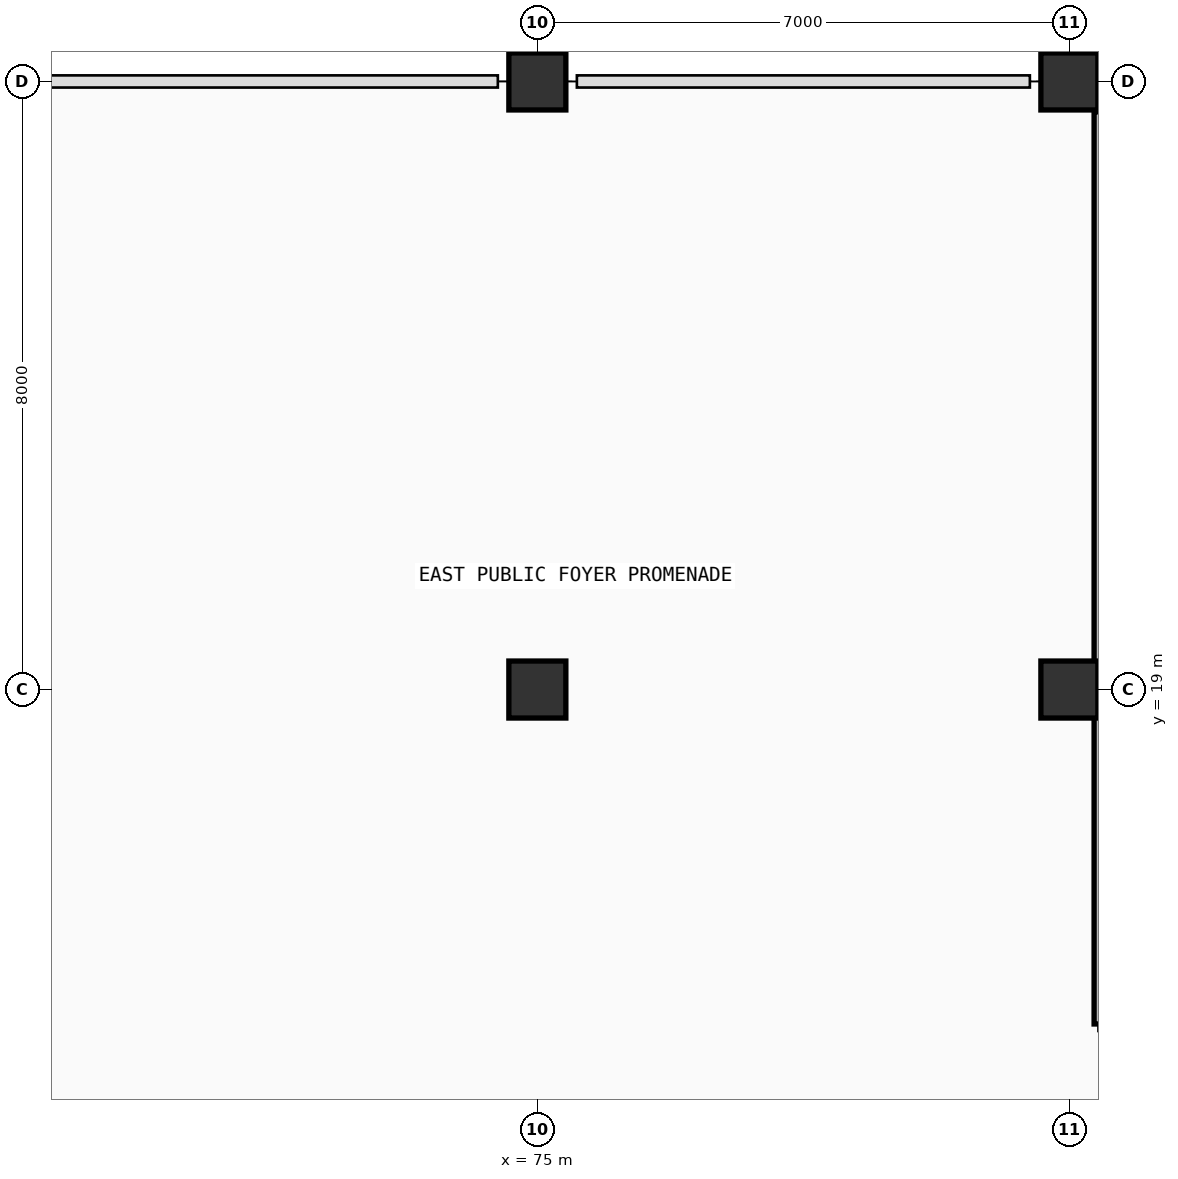
"""IFC4 building model, lengths in metres.
Left out: names, types, materials, properties, quantities, classifications, styles, units other than length and angle.
Written with IfcOpenShell. Run it as: python <this file> out.ifc"""

import sys

from ifc_helpers import new_model, si_unit, direction, frame, frame_2d, origin, origin_2d, place, context, subcontext, project, spatial, rectangle, extrude, element, save


model = new_model("IFC4")
c1 = context("Model", 3, precision=1e-05, world=origin(), true_north=direction((0.0, 1.0)))
c2 = subcontext(c1, "Body", "Model", "MODEL_VIEW")
j1 = project(units=[si_unit("LENGTHUNIT", "METRE"), si_unit("PLANEANGLEUNIT", "RADIAN")], contexts=[c1])
p1 = place(None, origin())
s1 = spatial("IfcSite", under=j1, at=p1, CompositionType="ELEMENT")
p2 = place(p1, origin())
s2 = spatial("IfcBuilding", under=s1, at=p2, CompositionType="ELEMENT")
p3 = place(p2, origin())
s3 = spatial("IfcBuildingStorey", under=s2, at=p3, CompositionType="ELEMENT", Elevation=0.0)
for number, where, z_axis, x_axis in (
    (1, (75.0, 19.0, 0.0), (0.0, 0.0, 1.0), (1.0, 0.0, 0.0)),
    (2, (75.0, 27.0, 0.0), (0.0, 0.0, 1.0), (1.0, 0.0, 0.0)),
    (3, (82.0, 19.0, 0.0), (0.0, 0.0, 1.0), (1.0, 0.0, 0.0)),
    (4, (82.0, 27.0, 0.0), (0.0, 0.0, 1.0), (1.0, 0.0, 0.0)),
):
    element("IfcColumn", number, at=place(p3, frame(where, z_axis=z_axis, x_axis=x_axis)), inside=s3, PredefinedType="COLUMN", context=c2, shape_type="SweptSolid", body=[
        extrude(rectangle(XDim=0.75, YDim=0.75, at=origin_2d()), origin(), (0.0, 0.0, 1.0), 5.4),
    ])
p4 = place(p3, frame((82.0, 27.0, 0.0), z_axis=(0.0, 0.0, 1.0), x_axis=(1.0, 0.0, 0.0)))
e5 = element("IfcWall", 5, at=p4, inside=s3, PredefinedType="SOLIDWALL", context=c2, shape_type="SweptSolid", body=[
    extrude(rectangle(XDim=8.0, YDim=0.38, at=frame_2d((4.0, 0.0))), origin(), (0.0, 0.0, 1.0), 5.4),
])
p5 = place(p3, frame((82.4, 14.6, 0.0), z_axis=(0.0, 0.0, 1.0), x_axis=(0.0, 1.0, 0.0)))
e6 = element("IfcWall", 6, at=p5, inside=s3, PredefinedType="PARTITIONING", context=c2, shape_type="SweptSolid", body=[
    extrude(rectangle(XDim=12.0, YDim=0.15, at=frame_2d((6.0, 0.0))), origin(), (0.0, 0.0, 1.0), 4.385),
])
save(model, sys.argv[1])
